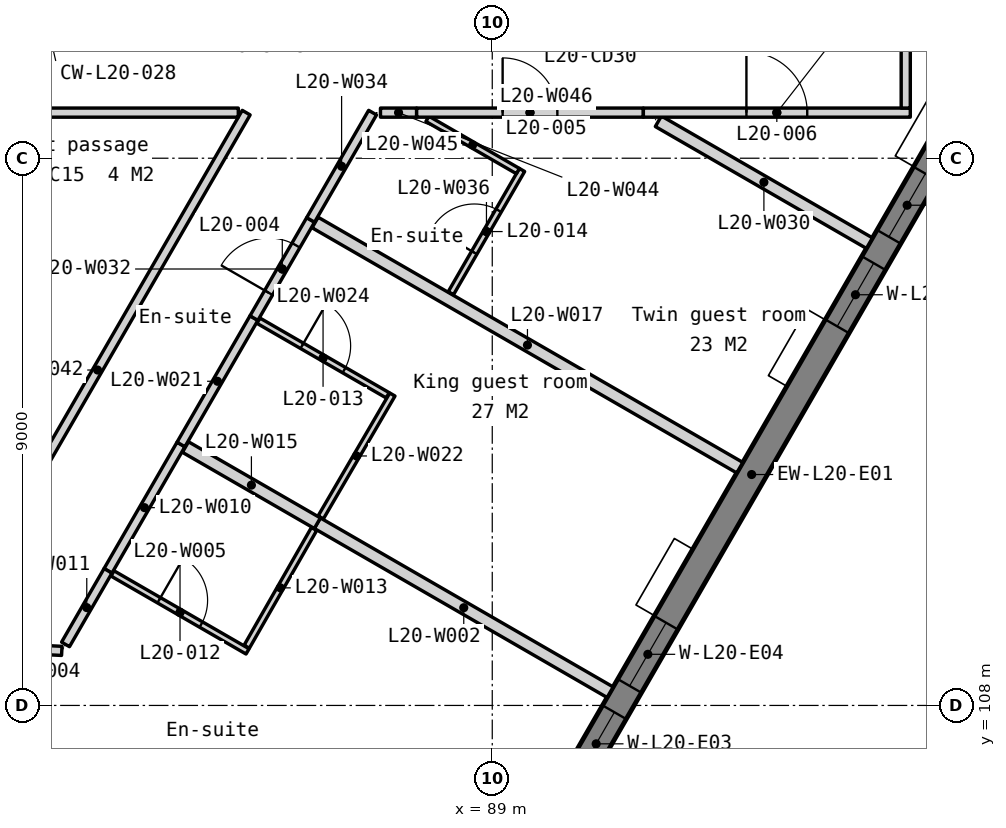
"""IFC4 building model, lengths in metres.
Left out: names, types, materials, properties, quantities, classifications, styles, units other than length and angle.
Written with IfcOpenShell. Run it as: python <this file> out.ifc"""

import sys

from ifc_helpers import new_model, si_unit, direction, frame, frame_2d, origin, place, context, subcontext, project, spatial, polyline, rectangle, outline, extrude, element, fill, save


model = new_model("IFC4")
c1 = context("Model", 3, precision=1e-05, world=origin(), true_north=direction((0.0, 1.0)))
c2 = subcontext(c1, "Body", "Model", "MODEL_VIEW")
j1 = project(units=[si_unit("LENGTHUNIT", "METRE"), si_unit("PLANEANGLEUNIT", "RADIAN")], contexts=[c1])
p1 = place(None, origin())
s1 = spatial("IfcSite", under=j1, at=p1, CompositionType="ELEMENT")
p2 = place(p1, origin())
s2 = spatial("IfcBuilding", under=s1, at=p2, CompositionType="ELEMENT")
p3 = place(p2, frame((0.0, 0.0, 85.3)))
s3 = spatial("IfcBuildingStorey", under=s2, at=p3, CompositionType="ELEMENT", Elevation=85.3)
p4 = place(p3, frame((82.605, 93.333, -0.15), z_axis=(0.0, 0.0, 1.0), x_axis=(0.500000478905, 0.866025127289, 0.0)))
e1 = element("IfcWall", 1, at=p4, inside=s3, PredefinedType="SOLIDWALL", context=c2, shape_type="SweptSolid", body=[
    extrude(outline(polyline([(42.643, 0.0), (42.643, 3.5), (0.0, 3.5), (0.0, 0.0), (42.643, 0.0)])), frame((0.0, 0.225, 0.0), z_axis=(0.0, -1.0, 0.0), x_axis=(1.0, 0.0, 0.0)), (0.0, 0.0, 1.0), 0.45),
])
p5 = place(p4, frame((7.079, 0.0, 1.05)))
e2 = element("IfcOpeningElement", 2, at=p5, cuts=e1, PredefinedType="OPENING", context=c2, shape_type="SweptSolid", body=[
    extrude(rectangle(XDim=1.2, YDim=1.5, at=frame_2d((0.6, 0.75))), frame((0.0, 0.235, 0.0), z_axis=(0.0, -1.0, 0.0), x_axis=(1.0, 0.0, 0.0)), (0.0, 0.0, 1.0), 0.47),
])
p6 = place(p4, frame((8.779, 0.0, 1.05)))
e3 = element("IfcOpeningElement", 3, at=p6, cuts=e1, PredefinedType="OPENING", context=c2, shape_type="SweptSolid", body=[
    extrude(rectangle(XDim=1.2, YDim=1.5, at=frame_2d((0.6, 0.75))), frame((0.0, 0.235, 0.0), z_axis=(0.0, -1.0, 0.0), x_axis=(1.0, 0.0, 0.0)), (0.0, 0.0, 1.0), 0.47),
])
p7 = place(p4, frame((15.607, 0.0, 1.05)))
e4 = element("IfcOpeningElement", 4, at=p7, cuts=e1, PredefinedType="OPENING", context=c2, shape_type="SweptSolid", body=[
    extrude(rectangle(XDim=1.2, YDim=1.5, at=frame_2d((0.6, 0.75))), frame((0.0, 0.235, 0.0), z_axis=(0.0, -1.0, 0.0), x_axis=(1.0, 0.0, 0.0)), (0.0, 0.0, 1.0), 0.47),
])
p8 = place(p4, frame((17.307, 0.0, 1.05)))
e5 = element("IfcOpeningElement", 5, at=p8, cuts=e1, PredefinedType="OPENING", context=c2, shape_type="SweptSolid", body=[
    extrude(rectangle(XDim=1.2, YDim=1.5, at=frame_2d((0.6, 0.75))), frame((0.0, 0.235, 0.0), z_axis=(0.0, -1.0, 0.0), x_axis=(1.0, 0.0, 0.0)), (0.0, 0.0, 1.0), 0.47),
])
p9 = place(p4, frame((24.136, 0.0, 1.05)))
e6 = element("IfcOpeningElement", 6, at=p9, cuts=e1, PredefinedType="OPENING", context=c2, shape_type="SweptSolid", body=[
    extrude(rectangle(XDim=1.2, YDim=1.5, at=frame_2d((0.6, 0.75))), frame((0.0, 0.235, 0.0), z_axis=(0.0, -1.0, 0.0), x_axis=(1.0, 0.0, 0.0)), (0.0, 0.0, 1.0), 0.47),
])
p10 = place(p4, frame((25.836, 0.0, 1.05)))
e7 = element("IfcOpeningElement", 7, at=p10, cuts=e1, PredefinedType="OPENING", context=c2, shape_type="SweptSolid", body=[
    extrude(rectangle(XDim=1.2, YDim=1.5, at=frame_2d((0.6, 0.75))), frame((0.0, 0.235, 0.0), z_axis=(0.0, -1.0, 0.0), x_axis=(1.0, 0.0, 0.0)), (0.0, 0.0, 1.0), 0.47),
])
p11 = place(p4, frame((32.665, 0.0, 1.05)))
e8 = element("IfcOpeningElement", 8, at=p11, cuts=e1, PredefinedType="OPENING", context=c2, shape_type="SweptSolid", body=[
    extrude(rectangle(XDim=1.2, YDim=1.5, at=frame_2d((0.6, 0.75))), frame((0.0, 0.235, 0.0), z_axis=(0.0, -1.0, 0.0), x_axis=(1.0, 0.0, 0.0)), (0.0, 0.0, 1.0), 0.47),
])
p12 = place(p4, frame((34.365, 0.0, 1.05)))
e9 = element("IfcOpeningElement", 9, at=p12, cuts=e1, PredefinedType="OPENING", context=c2, shape_type="SweptSolid", body=[
    extrude(rectangle(XDim=1.2, YDim=1.5, at=frame_2d((0.6, 0.75))), frame((0.0, 0.235, 0.0), z_axis=(0.0, -1.0, 0.0), x_axis=(1.0, 0.0, 0.0)), (0.0, 0.0, 1.0), 0.47),
])
p13 = place(p3, frame((86.124, 110.997, 0.0), z_axis=(0.0, 0.0, 1.0), x_axis=(0.866026912667, -0.49999738653, 0.0)))
e10 = element("IfcWall", 10, at=p13, inside=s3, PredefinedType="PARTITIONING", context=c2, shape_type="SweptSolid", body=[
    extrude(rectangle(XDim=5.56, YDim=0.2, at=frame_2d((2.78, 0.0))), origin(), (0.0, 0.0, 1.0), 3.35),
])
p14 = place(p3, frame((81.0, 108.943, 0.0), z_axis=(0.0, 0.0, 1.0), x_axis=(0.998784510433, -0.04928997584, 0.0)))
e11 = element("IfcWall", 11, at=p14, inside=s3, PredefinedType="PARTITIONING", context=c2, shape_type="SweptSolid", body=[
    extrude(rectangle(XDim=0.921, YDim=0.15, at=frame_2d((0.461, 0.0))), origin(), (0.0, 0.0, 1.0), 3.35),
])
p15 = place(p3, frame((82.754, 110.171, 0.0), z_axis=(0.0, 0.0, 1.0), x_axis=(0.866038183914, -0.499977863513, 0.0)))
e12 = element("IfcWall", 12, at=p15, inside=s3, PredefinedType="PARTITIONING", context=c2, shape_type="SweptSolid", body=[
    extrude(rectangle(XDim=2.565, YDim=0.1, at=frame_2d((1.282, 0.0))), origin(), (0.0, 0.0, 1.0), 3.35),
])
p16 = place(p15, frame((0.883, 0.0, 0.0)))
e13 = element("IfcOpeningElement", 13, at=p16, cuts=e12, PredefinedType="OPENING", context=c2, shape_type="SweptSolid", body=[
    extrude(rectangle(XDim=0.8, YDim=2.1, at=frame_2d((0.4, 1.05))), frame((0.0, 0.06, 0.0), z_axis=(0.0, -1.0, 0.0), x_axis=(1.0, 0.0, 0.0)), (0.0, 0.0, 1.0), 0.12),
])
p17 = place(p3, frame((82.681, 110.214, 0.0), z_axis=(0.0, 0.0, 1.0), x_axis=(0.500001309137, 0.866024647952, 0.0)))
e14 = element("IfcWall", 14, at=p17, inside=s3, PredefinedType="PARTITIONING", context=c2, shape_type="SweptSolid", body=[
    extrude(rectangle(XDim=2.4, YDim=0.15, at=frame_2d((1.2, 0.0))), origin(), (0.0, 0.0, 1.0), 3.35),
])
p18 = place(p3, frame((81.982, 109.004, 0.0), z_axis=(0.0, 0.0, 1.0), x_axis=(0.500009789943, 0.866019751484, 0.0)))
e15 = element("IfcWall", 15, at=p18, inside=s3, PredefinedType="PARTITIONING", context=c2, shape_type="SweptSolid", body=[
    extrude(rectangle(XDim=1.397, YDim=0.15, at=frame_2d((0.699, 0.0))), origin(), (0.0, 0.0, 1.0), 3.35),
])
p19 = place(p3, frame((84.962, 108.966, 0.0), z_axis=(0.0, 0.0, 1.0), x_axis=(0.496351132973, 0.868121853657, 0.0)))
e16 = element("IfcWall", 16, at=p19, inside=s3, PredefinedType="PARTITIONING", context=c2, shape_type="SweptSolid", body=[
    extrude(rectangle(XDim=2.23, YDim=0.1, at=frame_2d((1.115, 0.0))), origin(), (0.0, 0.0, 1.0), 3.35),
])
p20 = place(p3, frame((83.954, 112.25, 0.0), z_axis=(0.0, 0.0, 1.0), x_axis=(0.866039519639, -0.499975549825, 0.0)))
e17 = element("IfcWall", 17, at=p20, inside=s3, PredefinedType="PARTITIONING", context=c2, shape_type="SweptSolid", body=[
    extrude(rectangle(XDim=2.505, YDim=0.2, at=frame_2d((1.252, 0.0))), origin(), (0.0, 0.0, 1.0), 3.35),
])
p21 = place(p3, frame((86.087, 115.943, 0.0), z_axis=(0.0, 0.0, 1.0), x_axis=(0.866010152247, -0.500026415507, 0.0)))
e18 = element("IfcWall", 18, at=p21, inside=s3, PredefinedType="PARTITIONING", context=c2, shape_type="SweptSolid", body=[
    extrude(rectangle(XDim=8.065, YDim=0.2, at=frame_2d((4.032, 0.0))), origin(), (0.0, 0.0, 1.0), 3.35),
])
p22 = place(p3, frame((83.881, 112.292, 0.0), z_axis=(0.0, 0.0, 1.0), x_axis=(0.500001309137, 0.866024647952, 0.0)))
e19 = element("IfcWall", 19, at=p22, inside=s3, PredefinedType="PARTITIONING", context=c2, shape_type="SweptSolid", body=[
    extrude(rectangle(XDim=2.4, YDim=0.15, at=frame_2d((1.2, 0.0))), origin(), (0.0, 0.0, 1.0), 3.35),
])
p23 = place(p3, frame((86.179, 111.092, 0.0), z_axis=(0.0, 0.0, 1.0), x_axis=(0.503592070056, 0.863941564561, 0.0)))
e20 = element("IfcWall", 20, at=p23, inside=s3, PredefinedType="PARTITIONING", context=c2, shape_type="SweptSolid", body=[
    extrude(rectangle(XDim=2.34, YDim=0.1, at=frame_2d((1.17, 0.0))), origin(), (0.0, 0.0, 1.0), 3.35),
])
p24 = place(p3, frame((85.154, 114.328, 0.0), z_axis=(0.0, 0.0, 1.0), x_axis=(0.866074639999, -0.499914710676, 0.0)))
e21 = element("IfcWall", 21, at=p24, inside=s3, PredefinedType="PARTITIONING", context=c2, shape_type="SweptSolid", body=[
    extrude(rectangle(XDim=2.455, YDim=0.1, at=frame_2d((1.228, 0.0))), origin(), (0.0, 0.0, 1.0), 3.35),
])
p25 = place(p24, frame((0.827, 0.0, 0.0)))
e22 = element("IfcOpeningElement", 22, at=p25, cuts=e21, PredefinedType="OPENING", context=c2, shape_type="SweptSolid", body=[
    extrude(rectangle(XDim=0.8, YDim=2.1, at=frame_2d((0.4, 1.05))), frame((0.0, 0.06, 0.0), z_axis=(0.0, -1.0, 0.0), x_axis=(1.0, 0.0, 0.0)), (0.0, 0.0, 1.0), 0.12),
])
p26 = place(p3, frame((91.732, 117.607, 0.0), z_axis=(0.0, 0.0, 1.0), x_axis=(0.866034462328, -0.499984309814, 0.0)))
e23 = element("IfcWall", 23, at=p26, inside=s3, PredefinedType="PARTITIONING", context=c2, shape_type="SweptSolid", body=[
    extrude(rectangle(XDim=4.009, YDim=0.2, at=frame_2d((2.004, 0.0))), origin(), (0.0, 0.0, 1.0), 3.35),
])
p27 = place(p3, frame((85.081, 114.371, 0.0), z_axis=(0.0, 0.0, 1.0), x_axis=(0.499941596792, 0.866059120267, 0.0)))
e24 = element("IfcWall", 24, at=p27, inside=s3, PredefinedType="PARTITIONING", context=c2, shape_type="SweptSolid", body=[
    extrude(rectangle(XDim=1.865, YDim=0.15, at=frame_2d((0.932, 0.0))), origin(), (0.0, 0.0, 1.0), 3.35),
])
p28 = place(p27, frame((0.482, 0.0, 0.0)))
e25 = element("IfcOpeningElement", 25, at=p28, cuts=e24, PredefinedType="OPENING", context=c2, shape_type="SweptSolid", body=[
    extrude(rectangle(XDim=0.9, YDim=2.1, at=frame_2d((0.45, 1.05))), frame((0.0, 0.085, 0.0), z_axis=(0.0, -1.0, 0.0), x_axis=(1.0, 0.0, 0.0)), (0.0, 0.0, 1.0), 0.17),
])
p29 = place(p3, frame((86.013, 115.985, 0.0), z_axis=(0.0, 0.0, 1.0), x_axis=(0.499992114976, 0.866029956157, 0.0)))
e26 = element("IfcWall", 26, at=p29, inside=s3, PredefinedType="PARTITIONING", context=c2, shape_type="SweptSolid", body=[
    extrude(rectangle(XDim=2.038, YDim=0.15, at=frame_2d((1.019, 0.0))), origin(), (0.0, 0.0, 1.0), 3.35),
])
p30 = place(p3, frame((88.32, 114.781, 0.0), z_axis=(0.0, 0.0, 1.0), x_axis=(0.499954256575, 0.866051812152, 0.0)))
e27 = element("IfcWall", 27, at=p30, inside=s3, PredefinedType="PARTITIONING", context=c2, shape_type="SweptSolid", body=[
    extrude(rectangle(XDim=2.34, YDim=0.1, at=frame_2d((1.17, 0.0))), origin(), (0.0, 0.0, 1.0), 3.35),
])
p31 = place(p30, frame((0.77, 0.0, 0.0)))
e28 = element("IfcOpeningElement", 28, at=p31, cuts=e27, PredefinedType="OPENING", context=c2, shape_type="SweptSolid", body=[
    extrude(rectangle(XDim=0.8, YDim=2.1, at=frame_2d((0.4, 1.05))), frame((0.0, 0.06, 0.0), z_axis=(0.0, -1.0, 0.0), x_axis=(1.0, 0.0, 0.0)), (0.0, 0.0, 1.0), 0.12),
])
p32 = place(p3, frame((80.065, 109.283, 0.0), z_axis=(0.0, 0.0, 1.0), x_axis=(0.49999841397, 0.866026319477, 0.0)))
e29 = element("IfcWall", 29, at=p32, inside=s3, PredefinedType="PARTITIONING", context=c2, shape_type="SweptSolid", body=[
    extrude(rectangle(XDim=9.777, YDim=0.15, at=frame_2d((4.888, 0.0))), origin(), (0.0, 0.0, 1.0), 3.35),
])
p33 = place(p3, frame((75.177, 117.75, 0.0), z_axis=(0.0, 0.0, 1.0), x_axis=(1.0, 0.0, 0.0)))
e30 = element("IfcWall", 30, at=p33, inside=s3, PredefinedType="PARTITIONING", context=c2, shape_type="SweptSolid", body=[
    extrude(rectangle(XDim=9.647, YDim=0.15, at=frame_2d((4.823, 0.0))), origin(), (0.0, 0.0, 1.0), 3.35),
])
p34 = place(p3, frame((87.162, 117.75, 0.0), z_axis=(0.0, 0.0, 1.0), x_axis=(1.0, 0.0, 0.0)))
e31 = element("IfcWall", 31, at=p34, inside=s3, PredefinedType="PARTITIONING", context=c2, shape_type="SweptSolid", body=[
    extrude(rectangle(XDim=0.595, YDim=0.15, at=frame_2d((0.297, 0.0))), origin(), (0.0, 0.0, 1.0), 3.35),
])
p35 = place(p3, frame((87.934, 117.647, 0.0), z_axis=(0.0, 0.0, 1.0), x_axis=(0.866074343204, -0.499915224856, 0.0)))
e32 = element("IfcWall", 32, at=p35, inside=s3, PredefinedType="PARTITIONING", context=c2, shape_type="SweptSolid", body=[
    extrude(rectangle(XDim=1.718, YDim=0.1, at=frame_2d((0.859, 0.0))), origin(), (0.0, 0.0, 1.0), 3.35),
])
p36 = place(p3, frame((87.756, 117.75, 0.0), z_axis=(0.0, 0.0, 1.0), x_axis=(1.0, 0.0, 0.0)))
e33 = element("IfcWall", 33, at=p36, inside=s3, PredefinedType="PARTITIONING", context=c2, shape_type="SweptSolid", body=[
    extrude(rectangle(XDim=3.729, YDim=0.15, at=frame_2d((1.864, 0.0))), origin(), (0.0, 0.0, 1.0), 3.35),
])
p37 = place(p36, frame((1.414, 0.0, 0.0)))
e34 = element("IfcOpeningElement", 34, at=p37, cuts=e33, PredefinedType="OPENING", context=c2, shape_type="SweptSolid", body=[
    extrude(rectangle(XDim=0.9, YDim=2.1, at=frame_2d((0.45, 1.05))), frame((0.0, 0.085, 0.0), z_axis=(0.0, -1.0, 0.0), x_axis=(1.0, 0.0, 0.0)), (0.0, 0.0, 1.0), 0.17),
])
p38 = place(p3, frame((91.485, 117.75, 0.0), z_axis=(0.0, 0.0, 1.0), x_axis=(1.0, 0.0, 0.0)))
e35 = element("IfcWall", 35, at=p38, inside=s3, PredefinedType="PARTITIONING", context=c2, shape_type="SweptSolid", body=[
    extrude(rectangle(XDim=4.39, YDim=0.15, at=frame_2d((2.195, 0.0))), origin(), (0.0, 0.0, 1.0), 3.35),
])
p39 = place(p38, frame((1.695, 0.0, 0.0)))
e36 = element("IfcOpeningElement", 36, at=p39, cuts=e35, PredefinedType="OPENING", context=c2, shape_type="SweptSolid", body=[
    extrude(rectangle(XDim=1.0, YDim=2.1, at=frame_2d((0.5, 1.05))), frame((0.0, 0.085, 0.0), z_axis=(0.0, -1.0, 0.0), x_axis=(1.0, 0.0, 0.0)), (0.0, 0.0, 1.0), 0.17),
])
p40 = place(p3, frame((95.8, 117.825, 0.0), z_axis=(0.0, 0.0, 1.0), x_axis=(0.0, 1.0, 0.0)))
e37 = element("IfcWall", 37, at=p40, inside=s3, PredefinedType="PARTITIONING", context=c2, shape_type="SweptSolid", body=[
    extrude(rectangle(XDim=4.164, YDim=0.15, at=frame_2d((2.082, 0.0))), origin(), (0.0, 0.0, 1.0), 3.35),
])
p41 = place(p7, origin())
e38 = element("IfcWindow", 38, at=p41, inside=s3, PartitioningType="SINGLE_PANEL", PredefinedType="WINDOW", context=c2, shape_type="SweptSolid", body=[
    extrude(rectangle(XDim=1.2, YDim=1.5, at=frame_2d((0.6, 0.75))), frame((0.0, 0.03, 0.0), z_axis=(0.0, -1.0, 0.0), x_axis=(1.0, 0.0, 0.0)), (0.0, 0.0, 1.0), 0.06),
])
fill(e4, e38)
p42 = place(p8, origin())
e39 = element("IfcWindow", 39, at=p42, inside=s3, PartitioningType="SINGLE_PANEL", PredefinedType="WINDOW", context=c2, shape_type="SweptSolid", body=[
    extrude(rectangle(XDim=1.2, YDim=1.5, at=frame_2d((0.6, 0.75))), frame((0.0, 0.03, 0.0), z_axis=(0.0, -1.0, 0.0), x_axis=(1.0, 0.0, 0.0)), (0.0, 0.0, 1.0), 0.06),
])
fill(e5, e39)
p43 = place(p9, origin())
e40 = element("IfcWindow", 40, at=p43, inside=s3, PartitioningType="SINGLE_PANEL", PredefinedType="WINDOW", context=c2, shape_type="SweptSolid", body=[
    extrude(rectangle(XDim=1.2, YDim=1.5, at=frame_2d((0.6, 0.75))), frame((0.0, 0.03, 0.0), z_axis=(0.0, -1.0, 0.0), x_axis=(1.0, 0.0, 0.0)), (0.0, 0.0, 1.0), 0.06),
])
fill(e6, e40)
p44 = place(p10, origin())
e41 = element("IfcWindow", 41, at=p44, inside=s3, PartitioningType="SINGLE_PANEL", PredefinedType="WINDOW", context=c2, shape_type="SweptSolid", body=[
    extrude(rectangle(XDim=1.2, YDim=1.5, at=frame_2d((0.6, 0.75))), frame((0.0, 0.03, 0.0), z_axis=(0.0, -1.0, 0.0), x_axis=(1.0, 0.0, 0.0)), (0.0, 0.0, 1.0), 0.06),
])
fill(e7, e41)
p45 = place(p28, origin())
e42 = element("IfcDoor", 42, at=p45, inside=s3, OperationType="SINGLE_SWING_LEFT", PredefinedType="DOOR", context=c2, shape_type="SweptSolid", body=[
    extrude(rectangle(XDim=0.9, YDim=2.1, at=frame_2d((0.45, 1.05))), frame((0.0, 0.025, 0.0), z_axis=(0.0, -1.0, 0.0), x_axis=(1.0, 0.0, 0.0)), (0.0, 0.0, 1.0), 0.05),
])
fill(e25, e42)
p46 = place(p37, origin())
e43 = element("IfcDoor", 43, at=p46, inside=s3, OperationType="SINGLE_SWING_LEFT", PredefinedType="DOOR", context=c2, shape_type="SweptSolid", body=[
    extrude(rectangle(XDim=0.9, YDim=2.1, at=frame_2d((0.45, 1.05))), frame((0.0, 0.025, 0.0), z_axis=(0.0, -1.0, 0.0), x_axis=(1.0, 0.0, 0.0)), (0.0, 0.0, 1.0), 0.05),
])
fill(e34, e43)
p47 = place(p39, origin())
e44 = element("IfcDoor", 44, at=p47, inside=s3, OperationType="SINGLE_SWING_LEFT", PredefinedType="DOOR", context=c2, shape_type="SweptSolid", body=[
    extrude(rectangle(XDim=1.0, YDim=2.1, at=frame_2d((0.5, 1.05))), frame((0.0, 0.025, 0.0), z_axis=(0.0, -1.0, 0.0), x_axis=(1.0, 0.0, 0.0)), (0.0, 0.0, 1.0), 0.05),
])
fill(e36, e44)
p48 = place(p16, origin())
e45 = element("IfcDoor", 45, at=p48, inside=s3, OperationType="SINGLE_SWING_LEFT", PredefinedType="DOOR", context=c2, shape_type="SweptSolid", body=[
    extrude(rectangle(XDim=0.8, YDim=2.1, at=frame_2d((0.4, 1.05))), frame((0.0, 0.025, 0.0), z_axis=(0.0, -1.0, 0.0), x_axis=(1.0, 0.0, 0.0)), (0.0, 0.0, 1.0), 0.05),
])
fill(e13, e45)
p49 = place(p25, origin())
e46 = element("IfcDoor", 46, at=p49, inside=s3, OperationType="SINGLE_SWING_LEFT", PredefinedType="DOOR", context=c2, shape_type="SweptSolid", body=[
    extrude(rectangle(XDim=0.8, YDim=2.1, at=frame_2d((0.4, 1.05))), frame((0.0, 0.025, 0.0), z_axis=(0.0, -1.0, 0.0), x_axis=(1.0, 0.0, 0.0)), (0.0, 0.0, 1.0), 0.05),
])
fill(e22, e46)
p50 = place(p31, origin())
e47 = element("IfcDoor", 47, at=p50, inside=s3, OperationType="SINGLE_SWING_LEFT", PredefinedType="DOOR", context=c2, shape_type="SweptSolid", body=[
    extrude(rectangle(XDim=0.8, YDim=2.1, at=frame_2d((0.4, 1.05))), frame((0.0, 0.025, 0.0), z_axis=(0.0, -1.0, 0.0), x_axis=(1.0, 0.0, 0.0)), (0.0, 0.0, 1.0), 0.05),
])
fill(e28, e47)
save(model, sys.argv[1])
